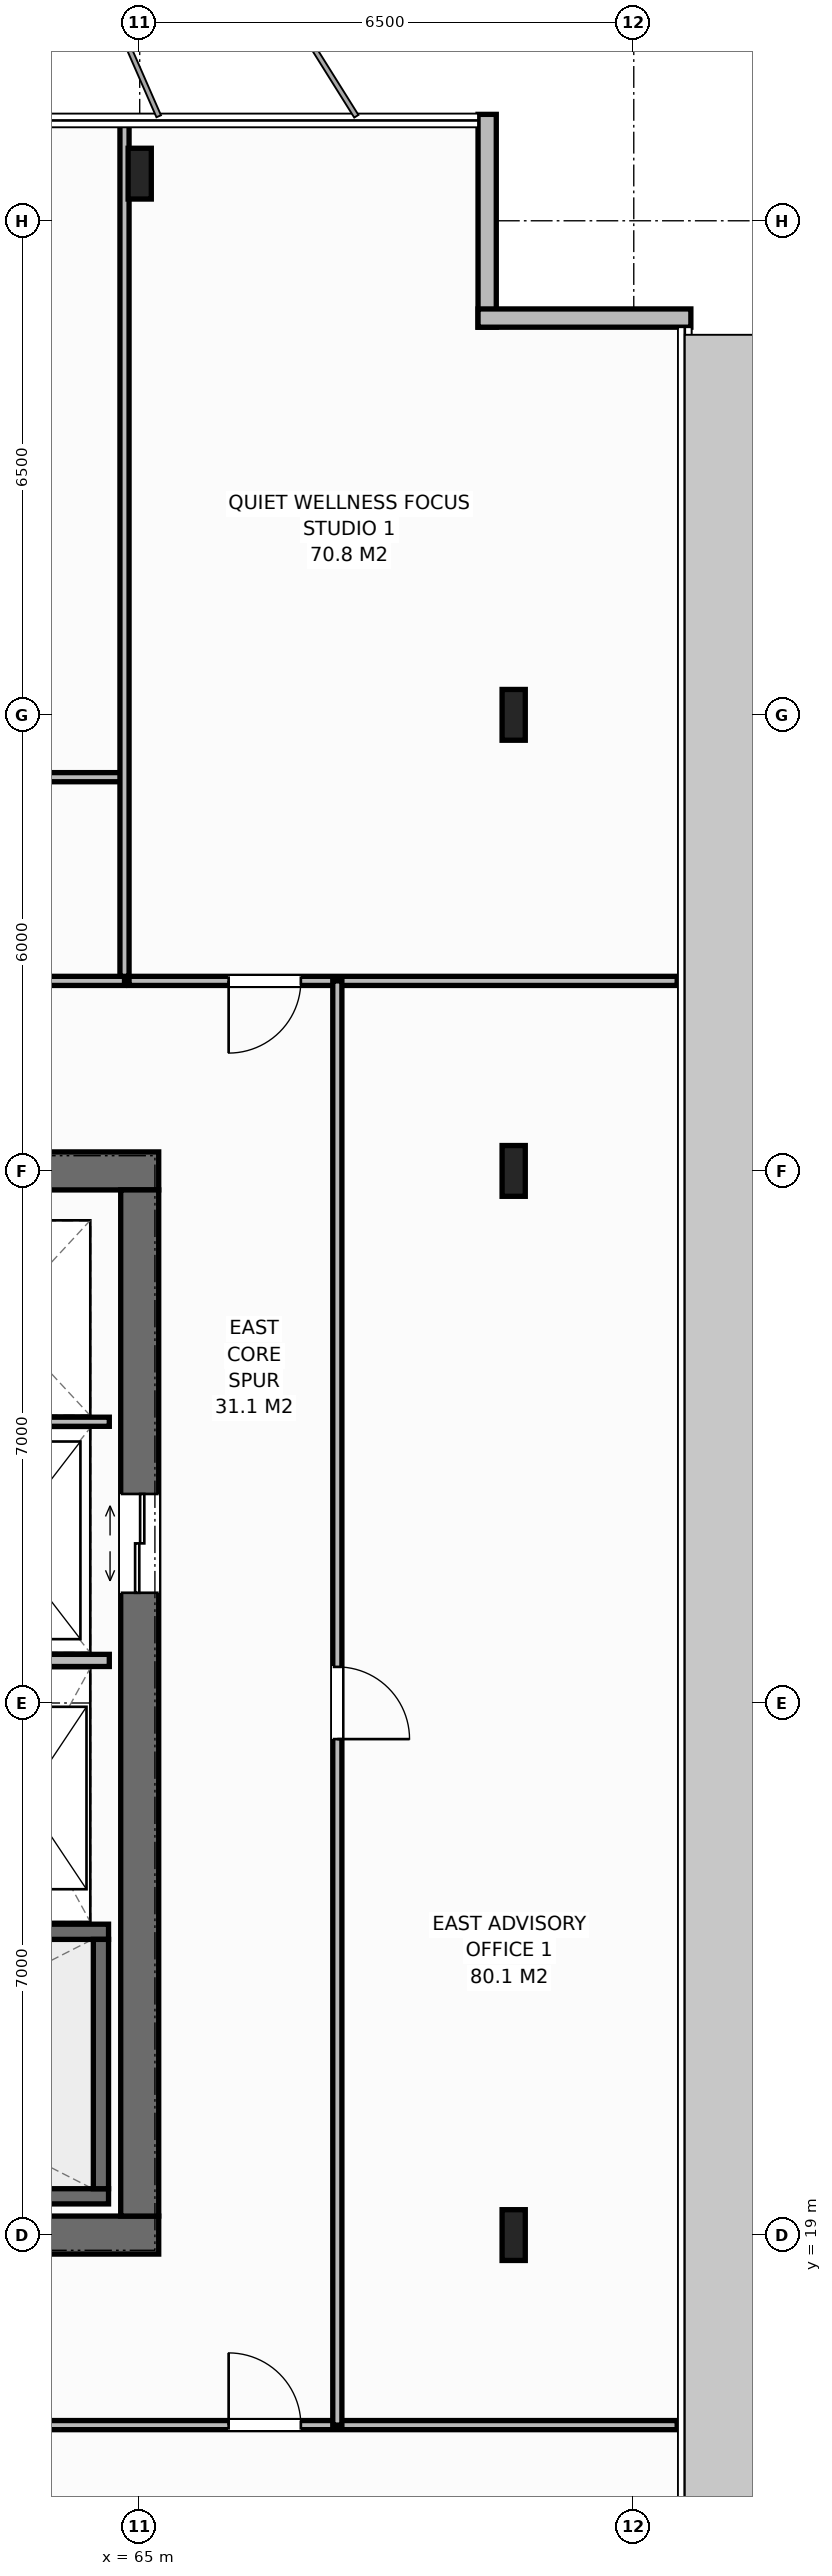
"""IFC4 building model, lengths in metres.
Left out: names, types, materials, properties, quantities, classifications, styles, units other than length and angle.
Written with IfcOpenShell. Run it as: python <this file> out.ifc"""

import sys

from ifc_helpers import new_model, si_unit, direction, frame, frame_2d, origin, origin_2d, place, context, subcontext, project, spatial, rectangle, i_section, extrude, element, fill, save


model = new_model("IFC4")
c1 = context("Model", 3, precision=1e-05, world=origin(), true_north=direction((0.0, 1.0)))
c2 = subcontext(c1, "Body", "Model", "MODEL_VIEW")
j1 = project(units=[si_unit("LENGTHUNIT", "METRE"), si_unit("PLANEANGLEUNIT", "RADIAN")], contexts=[c1])
p1 = place(None, origin())
s1 = spatial("IfcSite", under=j1, at=p1, CompositionType="ELEMENT")
p2 = place(p1, origin())
s2 = spatial("IfcBuilding", under=s1, at=p2, CompositionType="ELEMENT")
p3 = place(p2, frame((0.0, 0.0, 278.4)))
s3 = spatial("IfcBuildingStorey", under=s2, at=p3, CompositionType="ELEMENT", Elevation=278.4)
p4 = place(p3, frame((51.75, 19.0, 0.0), z_axis=(0.0, 0.0, 1.0), x_axis=(1.0, 0.0, 0.0)))
e1 = element("IfcWall", 1, at=p4, inside=s3, PredefinedType="SHEAR", context=c2, shape_type="SweptSolid", body=[
    extrude(rectangle(XDim=13.5, YDim=0.5, at=frame_2d((6.75, 0.0))), origin(), (0.0, 0.0, 1.0), 4.0),
])
p5 = place(p4, frame((2.97, 0.0, 0.0)))
e2 = element("IfcOpeningElement", 2, at=p5, cuts=e1, PredefinedType="OPENING", context=c2, shape_type="SweptSolid", body=[
    extrude(rectangle(XDim=1.4, YDim=2.2, at=frame_2d((0.7, 1.1))), frame((0.0, 0.26, 0.0), z_axis=(0.0, -1.0, 0.0), x_axis=(1.0, 0.0, 0.0)), (0.0, 0.0, 1.0), 0.52),
])
p6 = place(p3, frame((51.75, 33.0, 0.0), z_axis=(0.0, 0.0, 1.0), x_axis=(1.0, 0.0, 0.0)))
e3 = element("IfcWall", 3, at=p6, inside=s3, PredefinedType="SHEAR", context=c2, shape_type="SweptSolid", body=[
    extrude(rectangle(XDim=13.5, YDim=0.5, at=frame_2d((6.75, 0.0))), origin(), (0.0, 0.0, 1.0), 4.0),
])
p7 = place(p6, frame((2.97, 0.0, 0.0)))
e4 = element("IfcOpeningElement", 4, at=p7, cuts=e3, PredefinedType="OPENING", context=c2, shape_type="SweptSolid", body=[
    extrude(rectangle(XDim=1.4, YDim=2.2, at=frame_2d((0.7, 1.1))), frame((0.0, 0.26, 0.0), z_axis=(0.0, -1.0, 0.0), x_axis=(1.0, 0.0, 0.0)), (0.0, 0.0, 1.0), 0.52),
])
p8 = place(p6, frame((10.85, 0.0, 0.0)))
e5 = element("IfcOpeningElement", 5, at=p8, cuts=e3, PredefinedType="OPENING", context=c2, shape_type="SweptSolid", body=[
    extrude(rectangle(XDim=0.9, YDim=2.15, at=frame_2d((0.45, 1.075))), frame((0.0, 0.26, 0.0), z_axis=(0.0, -1.0, 0.0), x_axis=(1.0, 0.0, 0.0)), (0.0, 0.0, 1.0), 0.52),
])
p9 = place(p6, frame((5.6, 0.0, 0.0)))
e6 = element("IfcOpeningElement", 6, at=p9, cuts=e3, PredefinedType="OPENING", context=c2, shape_type="SweptSolid", body=[
    extrude(rectangle(XDim=0.9, YDim=2.15, at=frame_2d((0.45, 1.075))), frame((0.0, 0.26, 0.0), z_axis=(0.0, -1.0, 0.0), x_axis=(1.0, 0.0, 0.0)), (0.0, 0.0, 1.0), 0.52),
])
p10 = place(p6, frame((7.2, 0.0, 0.0)))
e7 = element("IfcOpeningElement", 7, at=p10, cuts=e3, PredefinedType="OPENING", context=c2, shape_type="SweptSolid", body=[
    extrude(rectangle(XDim=0.9, YDim=2.15, at=frame_2d((0.45, 1.075))), frame((0.0, 0.26, 0.0), z_axis=(0.0, -1.0, 0.0), x_axis=(1.0, 0.0, 0.0)), (0.0, 0.0, 1.0), 0.52),
])
p11 = place(p6, frame((8.8, 0.0, 0.0)))
e8 = element("IfcOpeningElement", 8, at=p11, cuts=e3, PredefinedType="OPENING", context=c2, shape_type="SweptSolid", body=[
    extrude(rectangle(XDim=0.9, YDim=2.15, at=frame_2d((0.45, 1.075))), frame((0.0, 0.26, 0.0), z_axis=(0.0, -1.0, 0.0), x_axis=(1.0, 0.0, 0.0)), (0.0, 0.0, 1.0), 0.52),
])
p12 = place(p3, frame((65.0, 19.25, 0.0), z_axis=(0.0, 0.0, 1.0), x_axis=(0.0, 1.0, 0.0)))
e9 = element("IfcWall", 9, at=p12, inside=s3, PredefinedType="SHEAR", context=c2, shape_type="SweptSolid", body=[
    extrude(rectangle(XDim=13.5, YDim=0.5, at=frame_2d((6.75, 0.0))), origin(), (0.0, 0.0, 1.0), 4.0),
])
p13 = place(p12, frame((8.2, 0.0, 0.0)))
e10 = element("IfcOpeningElement", 10, at=p13, cuts=e9, PredefinedType="OPENING", context=c2, shape_type="SweptSolid", body=[
    extrude(rectangle(XDim=1.3, YDim=2.2, at=frame_2d((0.65, 1.1))), frame((0.0, 0.26, 0.0), z_axis=(0.0, -1.0, 0.0), x_axis=(1.0, 0.0, 0.0)), (0.0, 0.0, 1.0), 0.52),
])
p14 = place(p3, frame((56.16, 19.51, 0.0), z_axis=(0.0, 0.0, 1.0), x_axis=(1.0, 0.0, 0.0)))
e11 = element("IfcWall", 11, at=p14, inside=s3, PredefinedType="SHEAR", context=c2, shape_type="SweptSolid", body=[
    extrude(rectangle(XDim=8.43, YDim=0.2, at=frame_2d((4.215, 0.0))), origin(), (0.0, 0.0, 1.0), 4.0),
])
p15 = place(p3, frame((56.16, 22.99, 0.0), z_axis=(0.0, 0.0, 1.0), x_axis=(1.0, 0.0, 0.0)))
e12 = element("IfcWall", 12, at=p15, inside=s3, PredefinedType="SHEAR", context=c2, shape_type="SweptSolid", body=[
    extrude(rectangle(XDim=8.43, YDim=0.2, at=frame_2d((4.215, 0.0))), origin(), (0.0, 0.0, 1.0), 4.0),
])
p16 = place(p15, frame((0.45, 0.0, 0.0)))
e13 = element("IfcOpeningElement", 13, at=p16, cuts=e12, PredefinedType="OPENING", context=c2, shape_type="SweptSolid", body=[
    extrude(rectangle(XDim=1.0, YDim=2.15, at=frame_2d((0.5, 1.075))), frame((0.0, 0.11, 0.0), z_axis=(0.0, -1.0, 0.0), x_axis=(1.0, 0.0, 0.0)), (0.0, 0.0, 1.0), 0.22),
])
p17 = place(p3, frame((64.49, 19.61, 0.0), z_axis=(0.0, 0.0, 1.0), x_axis=(0.0, 1.0, 0.0)))
e14 = element("IfcWall", 14, at=p17, inside=s3, PredefinedType="SHEAR", context=c2, shape_type="SweptSolid", body=[
    extrude(rectangle(XDim=3.28, YDim=0.2, at=frame_2d((1.64, 0.0))), origin(), (0.0, 0.0, 1.0), 4.0),
])
for number, where, z_axis, x_axis in (
    (15, (65.0, 46.12, 0.0), (0.0, 0.0, 1.0), (1.0, 0.0, 0.0)),
    (16, (69.92, 19.0, 0.0), (0.0, 0.0, 1.0), (1.0, 0.0, 0.0)),
    (17, (69.92, 33.0, 0.0), (0.0, 0.0, 1.0), (1.0, 0.0, 0.0)),
    (18, (69.92, 39.0, 0.0), (0.0, 0.0, 1.0), (1.0, 0.0, 0.0)),
):
    element("IfcColumn", number, at=place(p3, frame(where, z_axis=z_axis, x_axis=x_axis)), inside=s3, PredefinedType="COLUMN", context=c2, shape_type="SweptSolid", body=[
        extrude(i_section(OverallWidth=0.305, OverallDepth=0.668, WebThickness=0.021, FlangeThickness=0.04, at=origin_2d()), origin(), (0.0, 0.0, 1.0), 4.0),
    ])
p18 = place(p3, frame((69.571, 46.9, 0.0), z_axis=(0.0, 0.0, 1.0), x_axis=(0.0, -1.0, 0.0)))
e19 = element("IfcWall", 19, at=p18, inside=s3, PredefinedType="STANDARD", context=c2, shape_type="SweptSolid", body=[
    extrude(rectangle(XDim=2.8, YDim=0.24, at=frame_2d((1.4, 0.0))), origin(), (0.0, 0.0, 1.0), 3.788),
])
p19 = place(p3, frame((69.451, 44.22, 0.0), z_axis=(0.0, 0.0, 1.0), x_axis=(1.0, 0.0, 0.0)))
e20 = element("IfcWall", 20, at=p19, inside=s3, PredefinedType="STANDARD", context=c2, shape_type="SweptSolid", body=[
    extrude(rectangle(XDim=2.8, YDim=0.24, at=frame_2d((1.4, 0.0))), origin(), (0.0, 0.0, 1.0), 3.788),
])
p20 = place(p3, frame((56.26, 26.56, 0.0), z_axis=(0.0, 0.0, 1.0), x_axis=(1.0, 0.0, 0.0)))
e21 = element("IfcWall", 21, at=p20, inside=s3, PredefinedType="STANDARD", context=c2, shape_type="SweptSolid", body=[
    extrude(rectangle(XDim=8.34, YDim=0.16, at=frame_2d((4.17, 0.0))), origin(), (0.0, 0.0, 1.0), 3.788),
])
p21 = place(p3, frame((61.87, 29.7, 0.0), z_axis=(0.0, 0.0, 1.0), x_axis=(1.0, 0.0, 0.0)))
e22 = element("IfcWall", 22, at=p21, inside=s3, PredefinedType="PARTITIONING", context=c2, shape_type="SweptSolid", body=[
    extrude(rectangle(XDim=2.73, YDim=0.12, at=frame_2d((1.365, 0.0))), origin(), (0.0, 0.0, 1.0), 3.788),
])
p22 = place(p3, frame((51.64, 35.5, 0.0), z_axis=(0.0, 0.0, 1.0), x_axis=(1.0, 0.0, 0.0)))
e23 = element("IfcWall", 23, at=p22, inside=s3, PredefinedType="PARTITIONING", context=c2, shape_type="SweptSolid", body=[
    extrude(rectangle(XDim=13.16, YDim=0.12, at=frame_2d((6.58, 0.0))), origin(), (0.0, 0.0, 1.0), 3.788),
])
p23 = place(p22, frame((1.51, 0.0, 0.0)))
e24 = element("IfcOpeningElement", 24, at=p23, cuts=e23, PredefinedType="OPENING", context=c2, shape_type="SweptSolid", body=[
    extrude(rectangle(XDim=0.9, YDim=2.15, at=frame_2d((0.45, 1.075))), frame((0.0, 0.07, 0.0), z_axis=(0.0, -1.0, 0.0), x_axis=(1.0, 0.0, 0.0)), (0.0, 0.0, 1.0), 0.14),
])
p24 = place(p22, frame((4.51, 0.0, 0.0)))
e25 = element("IfcOpeningElement", 25, at=p24, cuts=e23, PredefinedType="OPENING", context=c2, shape_type="SweptSolid", body=[
    extrude(rectangle(XDim=0.9, YDim=2.15, at=frame_2d((0.45, 1.075))), frame((0.0, 0.07, 0.0), z_axis=(0.0, -1.0, 0.0), x_axis=(1.0, 0.0, 0.0)), (0.0, 0.0, 1.0), 0.14),
])
p25 = place(p22, frame((8.36, 0.0, 0.0)))
e26 = element("IfcOpeningElement", 26, at=p25, cuts=e23, PredefinedType="OPENING", context=c2, shape_type="SweptSolid", body=[
    extrude(rectangle(XDim=0.9, YDim=2.15, at=frame_2d((0.45, 1.075))), frame((0.0, 0.07, 0.0), z_axis=(0.0, -1.0, 0.0), x_axis=(1.0, 0.0, 0.0)), (0.0, 0.0, 1.0), 0.14),
])
p26 = place(p22, frame((10.96, 0.0, 0.0)))
e27 = element("IfcOpeningElement", 27, at=p26, cuts=e23, PredefinedType="OPENING", context=c2, shape_type="SweptSolid", body=[
    extrude(rectangle(XDim=0.95, YDim=2.15, at=frame_2d((0.475, 1.075))), frame((0.0, 0.07, 0.0), z_axis=(0.0, -1.0, 0.0), x_axis=(1.0, 0.0, 0.0)), (0.0, 0.0, 1.0), 0.14),
])
p27 = place(p3, frame((51.64, 38.18, 0.0), z_axis=(0.0, 0.0, 1.0), x_axis=(1.0, 0.0, 0.0)))
e28 = element("IfcWall", 28, at=p27, inside=s3, PredefinedType="PARTITIONING", context=c2, shape_type="SweptSolid", body=[
    extrude(rectangle(XDim=13.16, YDim=0.12, at=frame_2d((6.58, 0.0))), origin(), (0.0, 0.0, 1.0), 3.788),
])
p28 = place(p3, frame((64.8, 35.56, 0.0), z_axis=(0.0, 0.0, 1.0), x_axis=(0.0, 1.0, 0.0)))
e29 = element("IfcWall", 29, at=p28, inside=s3, PredefinedType="PARTITIONING", context=c2, shape_type="SweptSolid", body=[
    extrude(rectangle(XDim=11.32, YDim=0.12, at=frame_2d((5.66, 0.0))), origin(), (0.0, 0.0, 1.0), 2.988),
])
p29 = place(p3, frame((64.86, 35.5, 0.0), z_axis=(0.0, 0.0, 1.0), x_axis=(1.0, 0.0, 0.0)))
e30 = element("IfcWall", 30, at=p29, inside=s3, PredefinedType="PARTITIONING", context=c2, shape_type="SweptSolid", body=[
    extrude(rectangle(XDim=7.211, YDim=0.12, at=frame_2d((3.605, 0.0))), origin(), (0.0, 0.0, 1.0), 3.788),
])
p30 = place(p29, frame((1.31, 0.0, 0.0)))
e31 = element("IfcOpeningElement", 31, at=p30, cuts=e30, PredefinedType="OPENING", context=c2, shape_type="SweptSolid", body=[
    extrude(rectangle(XDim=0.95, YDim=2.15, at=frame_2d((0.475, 1.075))), frame((0.0, 0.07, 0.0), z_axis=(0.0, -1.0, 0.0), x_axis=(1.0, 0.0, 0.0)), (0.0, 0.0, 1.0), 0.14),
])
p31 = place(p3, frame((63.126, 16.5, 0.0), z_axis=(0.0, 0.0, 1.0), x_axis=(1.0, 0.0, 0.0)))
e32 = element("IfcWall", 32, at=p31, inside=s3, PredefinedType="PARTITIONING", context=c2, shape_type="SweptSolid", body=[
    extrude(rectangle(XDim=8.945, YDim=0.12, at=frame_2d((4.472, 0.0))), origin(), (0.0, 0.0, 1.0), 3.788),
])
p32 = place(p31, frame((3.044, 0.0, 0.0)))
e33 = element("IfcOpeningElement", 33, at=p32, cuts=e32, PredefinedType="OPENING", context=c2, shape_type="SweptSolid", body=[
    extrude(rectangle(XDim=0.95, YDim=2.15, at=frame_2d((0.475, 1.075))), frame((0.0, 0.07, 0.0), z_axis=(0.0, -1.0, 0.0), x_axis=(1.0, 0.0, 0.0)), (0.0, 0.0, 1.0), 0.14),
])
p33 = place(p3, frame((67.6, 16.5, 0.0), z_axis=(0.0, 0.0, 1.0), x_axis=(0.0, 1.0, 0.0)))
e34 = element("IfcWall", 34, at=p33, inside=s3, PredefinedType="PARTITIONING", context=c2, shape_type="SweptSolid", body=[
    extrude(rectangle(XDim=19.0, YDim=0.12, at=frame_2d((9.5, 0.0))), origin(), (0.0, 0.0, 1.0), 3.788),
])
p34 = place(p33, frame((9.025, 0.0, 0.0)))
e35 = element("IfcOpeningElement", 35, at=p34, cuts=e34, PredefinedType="OPENING", context=c2, shape_type="SweptSolid", body=[
    extrude(rectangle(XDim=0.95, YDim=2.15, at=frame_2d((0.475, 1.075))), frame((0.0, 0.07, 0.0), z_axis=(0.0, -1.0, 0.0), x_axis=(1.0, 0.0, 0.0)), (0.0, 0.0, 1.0), 0.14),
])
p35 = place(p13, origin())
e36 = element("IfcDoor", 36, at=p35, inside=s3, OperationType="DOUBLE_DOOR_SLIDING", PredefinedType="DOOR", context=c2, shape_type="SweptSolid", body=[
    extrude(rectangle(XDim=1.3, YDim=2.2, at=frame_2d((0.65, 1.1))), frame((0.0, 0.025, 0.0), z_axis=(0.0, -1.0, 0.0), x_axis=(1.0, 0.0, 0.0)), (0.0, 0.0, 1.0), 0.05),
])
fill(e10, e36)
p36 = place(p30, origin())
e37 = element("IfcDoor", 37, at=p36, inside=s3, OperationType="SINGLE_SWING_RIGHT", PredefinedType="DOOR", context=c2, shape_type="SweptSolid", body=[
    extrude(rectangle(XDim=0.95, YDim=2.15, at=frame_2d((0.475, 1.075))), frame((0.0, 0.025, 0.0), z_axis=(0.0, -1.0, 0.0), x_axis=(1.0, 0.0, 0.0)), (0.0, 0.0, 1.0), 0.05),
])
fill(e31, e37)
p37 = place(p32, origin())
e38 = element("IfcDoor", 38, at=p37, inside=s3, OperationType="SINGLE_SWING_LEFT", PredefinedType="DOOR", context=c2, shape_type="SweptSolid", body=[
    extrude(rectangle(XDim=0.95, YDim=2.15, at=frame_2d((0.475, 1.075))), frame((0.0, 0.025, 0.0), z_axis=(0.0, -1.0, 0.0), x_axis=(1.0, 0.0, 0.0)), (0.0, 0.0, 1.0), 0.05),
])
fill(e33, e38)
p38 = place(p34, origin())
e39 = element("IfcDoor", 39, at=p38, inside=s3, OperationType="SINGLE_SWING_RIGHT", PredefinedType="DOOR", context=c2, shape_type="SweptSolid", body=[
    extrude(rectangle(XDim=0.95, YDim=2.15, at=frame_2d((0.475, 1.075))), frame((0.0, 0.025, 0.0), z_axis=(0.0, -1.0, 0.0), x_axis=(1.0, 0.0, 0.0)), (0.0, 0.0, 1.0), 0.05),
])
fill(e35, e39)
save(model, sys.argv[1])
